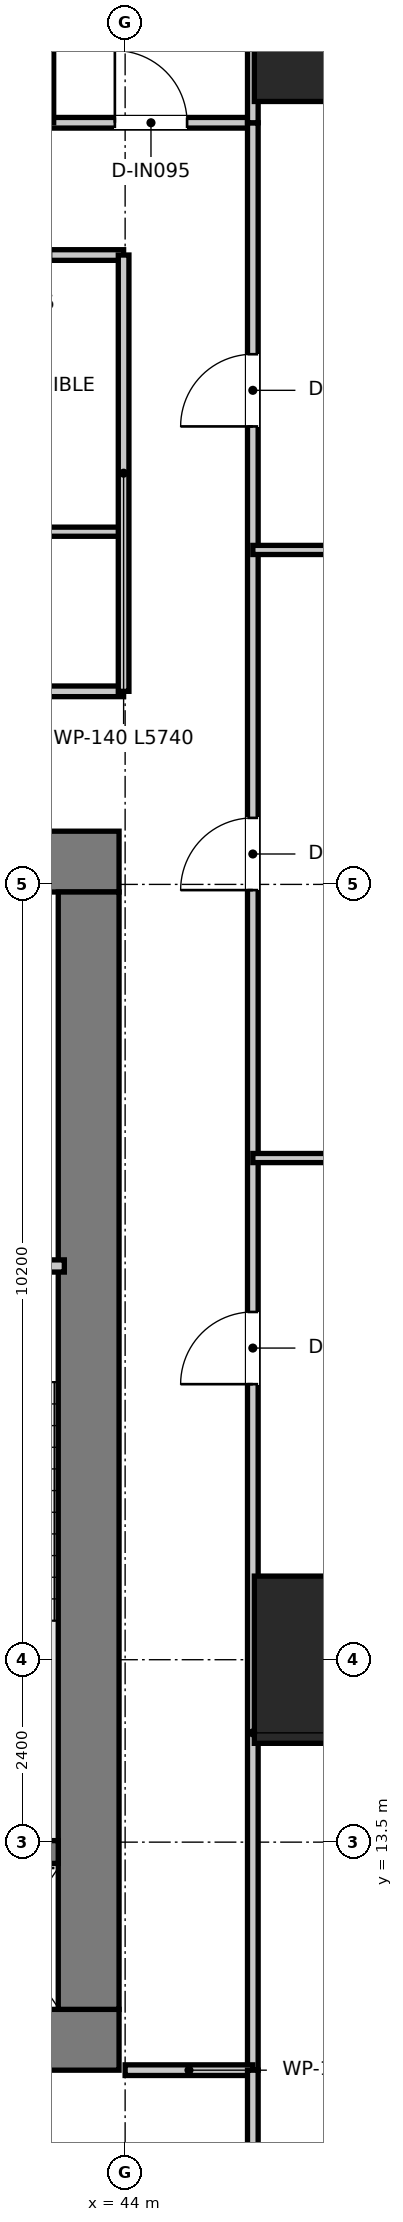
"""IFC4 building model, lengths in metres.
Left out: names, types, materials, properties, quantities, classifications, styles, units other than length and angle.
Written with IfcOpenShell. Run it as: python <this file> out.ifc"""

import sys

from ifc_helpers import new_model, si_unit, direction, frame, frame_2d, origin, origin_2d, place, context, subcontext, project, spatial, rectangle, extrude, source, transform, mapped, element, fill, save


model = new_model("IFC4")
c1 = context("Model", 3, precision=1e-05, world=origin(), true_north=direction((0.0, 1.0)))
c2 = subcontext(c1, "Body", "Model", "MODEL_VIEW")
j1 = project(units=[si_unit("LENGTHUNIT", "METRE"), si_unit("PLANEANGLEUNIT", "RADIAN")], contexts=[c1])
p1 = place(None, origin())
s1 = spatial("IfcSite", under=j1, at=p1, CompositionType="ELEMENT")
p2 = place(p1, origin())
s2 = spatial("IfcBuilding", under=s1, at=p2, CompositionType="ELEMENT")
p3 = place(p2, frame((0.0, 0.0, 56.6)))
s3 = spatial("IfcBuildingStorey", under=s2, at=p3, CompositionType="ELEMENT", Elevation=56.6)
p4 = place(p3, frame((28.08, 10.9, 0.0), z_axis=(0.0, 0.0, 1.0), x_axis=(1.0, 0.0, 0.0)))
e1 = element("IfcWall", 1, at=p4, inside=s3, PredefinedType="SHEAR", context=c2, shape_type="SweptSolid", body=[
    extrude(rectangle(XDim=15.84, YDim=0.8, at=frame_2d((7.92, 0.0))), origin(), (0.0, 0.0, 1.0), 3.95),
])
p5 = place(p3, frame((28.08, 26.4, 0.0), z_axis=(0.0, 0.0, 1.0), x_axis=(1.0, 0.0, 0.0)))
e2 = element("IfcWall", 2, at=p5, inside=s3, PredefinedType="SHEAR", context=c2, shape_type="SweptSolid", body=[
    extrude(rectangle(XDim=15.84, YDim=0.8, at=frame_2d((7.92, 0.0))), origin(), (0.0, 0.0, 1.0), 3.95),
])
p6 = place(p5, frame((7.22, 0.0, 0.0)))
e3 = element("IfcOpeningElement", 3, at=p6, cuts=e2, PredefinedType="OPENING", context=c2, shape_type="SweptSolid", body=[
    extrude(rectangle(XDim=1.4, YDim=2.2, at=frame_2d((0.7, 1.1))), frame((0.0, 0.41, 0.0), z_axis=(0.0, -1.0, 0.0), x_axis=(1.0, 0.0, 0.0)), (0.0, 0.0, 1.0), 0.82),
])
p7 = place(p5, frame((1.775, 0.0, 0.0)))
e4 = element("IfcOpeningElement", 4, at=p7, cuts=e2, PredefinedType="OPENING", context=c2, shape_type="SweptSolid", body=[
    extrude(rectangle(XDim=1.05, YDim=2.1, at=frame_2d((0.525, 1.05))), frame((0.0, 0.41, 0.0), z_axis=(0.0, -1.0, 0.0), x_axis=(1.0, 0.0, 0.0)), (0.0, 0.0, 1.0), 0.82),
])
p8 = place(p5, frame((13.015, 0.0, 0.0)))
e5 = element("IfcOpeningElement", 5, at=p8, cuts=e2, PredefinedType="OPENING", context=c2, shape_type="SweptSolid", body=[
    extrude(rectangle(XDim=1.05, YDim=2.1, at=frame_2d((0.525, 1.05))), frame((0.0, 0.41, 0.0), z_axis=(0.0, -1.0, 0.0), x_axis=(1.0, 0.0, 0.0)), (0.0, 0.0, 1.0), 0.82),
])
p9 = place(p3, frame((43.52, 11.3, 0.0), z_axis=(0.0, 0.0, 1.0), x_axis=(0.0, 1.0, 0.0)))
e6 = element("IfcWall", 6, at=p9, inside=s3, PredefinedType="SHEAR", context=c2, shape_type="SweptSolid", body=[
    extrude(rectangle(XDim=14.7, YDim=0.8, at=frame_2d((7.35, 0.0))), origin(), (0.0, 0.0, 1.0), 3.95),
])
p10 = place(p3, frame((40.02, 13.37, 0.0), z_axis=(0.0, 0.0, 1.0), x_axis=(1.0, 0.0, 0.0)))
e7 = element("IfcWall", 7, at=p10, inside=s3, PredefinedType="SHEAR", context=c2, shape_type="SweptSolid", body=[
    extrude(rectangle(XDim=3.1, YDim=0.3, at=frame_2d((1.55, 0.0))), origin(), (0.0, 0.0, 1.0), 3.95),
])
m1 = source(origin(), c2, "Body", "SweptSolid", [
    extrude(rectangle(XDim=2.2, YDim=2.2, at=origin_2d()), origin(), (0.0, 0.0, 1.0), 3.95),
])
for number, where, z_axis, x_axis in (
    (8, (46.8, 15.9, 0.0), (0.0, 0.0, 1.0), (1.0, 0.0, 0.0)),
    (9, (46.8, 37.5, 0.0), (0.0, 0.0, 1.0), (1.0, 0.0, 0.0)),
):
    element("IfcColumn", number, at=place(p3, frame(where, z_axis=z_axis, x_axis=x_axis)), inside=s3, PredefinedType="USERDEFINED", context=c2, shape_type="MappedRepresentation", body=[
        mapped(m1, transform((0.0, 0.0, 0.0), x_axis=(1.0, 0.0, 0.0), y_axis=(0.0, 1.0, 0.0), z_axis=(0.0, 0.0, 1.0), scale=1.0)),
    ])
p11 = place(p3, frame((40.04, 21.08, 0.0), z_axis=(0.0, 0.0, 1.0), x_axis=(1.0, 0.0, 0.0)))
e10 = element("IfcWall", 10, at=p11, inside=s3, PredefinedType="PARTITIONING", context=c2, shape_type="SweptSolid", body=[
    extrude(rectangle(XDim=3.16, YDim=0.16, at=frame_2d((1.58, 0.0))), origin(), (0.0, 0.0, 1.0), 3.67),
])
p12 = place(p11, frame((1.055, 0.0, 0.0)))
e11 = element("IfcOpeningElement", 11, at=p12, cuts=e10, PredefinedType="OPENING", context=c2, shape_type="SweptSolid", body=[
    extrude(rectangle(XDim=1.05, YDim=2.1, at=frame_2d((0.525, 1.05))), frame((0.0, 0.09, 0.0), z_axis=(0.0, -1.0, 0.0), x_axis=(1.0, 0.0, 0.0)), (0.0, 0.0, 1.0), 0.18),
])
p13 = place(p3, frame((28.02, 28.64, 0.0), z_axis=(0.0, 0.0, 1.0), x_axis=(1.0, 0.0, 0.0)))
e12 = element("IfcWall", 12, at=p13, inside=s3, PredefinedType="PARTITIONING", context=c2, shape_type="SweptSolid", body=[
    extrude(rectangle(XDim=15.96, YDim=0.14, at=frame_2d((7.98, 0.0))), origin(), (0.0, 0.0, 1.0), 3.08),
])
p14 = place(p13, frame((7.455, 0.0, 0.0)))
e13 = element("IfcOpeningElement", 13, at=p14, cuts=e12, PredefinedType="OPENING", context=c2, shape_type="SweptSolid", body=[
    extrude(rectangle(XDim=1.05, YDim=2.15, at=frame_2d((0.525, 1.075))), frame((0.0, 0.08, 0.0), z_axis=(0.0, -1.0, 0.0), x_axis=(1.0, 0.0, 0.0)), (0.0, 0.0, 1.0), 0.16),
])
p15 = place(p3, frame((28.02, 30.74, 0.0), z_axis=(0.0, 0.0, 1.0), x_axis=(1.0, 0.0, 0.0)))
e14 = element("IfcWall", 14, at=p15, inside=s3, PredefinedType="PARTITIONING", context=c2, shape_type="SweptSolid", body=[
    extrude(rectangle(XDim=15.96, YDim=0.12, at=frame_2d((7.98, 0.0))), origin(), (0.0, 0.0, 1.0), 3.08),
])
p16 = place(p3, frame((28.02, 34.38, 0.0), z_axis=(0.0, 0.0, 1.0), x_axis=(1.0, 0.0, 0.0)))
e15 = element("IfcWall", 15, at=p16, inside=s3, PredefinedType="PARTITIONING", context=c2, shape_type="SweptSolid", body=[
    extrude(rectangle(XDim=15.96, YDim=0.14, at=frame_2d((7.98, 0.0))), origin(), (0.0, 0.0, 1.0), 3.08),
])
p17 = place(p16, frame((7.83, 0.0, 0.0)))
e16 = element("IfcOpeningElement", 16, at=p17, cuts=e15, PredefinedType="OPENING", context=c2, shape_type="SweptSolid", body=[
    extrude(rectangle(XDim=0.9, YDim=2.1, at=frame_2d((0.45, 1.05))), frame((0.0, 0.08, 0.0), z_axis=(0.0, -1.0, 0.0), x_axis=(1.0, 0.0, 0.0)), (0.0, 0.0, 1.0), 0.16),
])
p18 = place(p16, frame((11.03, 0.0, 0.0)))
e17 = element("IfcOpeningElement", 17, at=p18, cuts=e15, PredefinedType="OPENING", context=c2, shape_type="SweptSolid", body=[
    extrude(rectangle(XDim=0.9, YDim=2.1, at=frame_2d((0.45, 1.05))), frame((0.0, 0.08, 0.0), z_axis=(0.0, -1.0, 0.0), x_axis=(1.0, 0.0, 0.0)), (0.0, 0.0, 1.0), 0.16),
])
p19 = place(p16, frame((14.055, 0.0, 0.0)))
e18 = element("IfcOpeningElement", 18, at=p19, cuts=e15, PredefinedType="OPENING", context=c2, shape_type="SweptSolid", body=[
    extrude(rectangle(XDim=0.95, YDim=2.1, at=frame_2d((0.475, 1.05))), frame((0.0, 0.08, 0.0), z_axis=(0.0, -1.0, 0.0), x_axis=(1.0, 0.0, 0.0)), (0.0, 0.0, 1.0), 0.16),
])
p20 = place(p16, frame((2.855, 0.0, 0.0)))
e19 = element("IfcOpeningElement", 19, at=p20, cuts=e15, PredefinedType="OPENING", context=c2, shape_type="SweptSolid", body=[
    extrude(rectangle(XDim=0.95, YDim=2.1, at=frame_2d((0.475, 1.05))), frame((0.0, 0.08, 0.0), z_axis=(0.0, -1.0, 0.0), x_axis=(1.0, 0.0, 0.0)), (0.0, 0.0, 1.0), 0.16),
])
p21 = place(p3, frame((43.98, 28.64, 0.0), z_axis=(0.0, 0.0, 1.0), x_axis=(0.0, 1.0, 0.0)))
e20 = element("IfcWall", 20, at=p21, inside=s3, PredefinedType="PARTITIONING", context=c2, shape_type="SweptSolid", body=[
    extrude(rectangle(XDim=5.74, YDim=0.14, at=frame_2d((2.87, 0.0))), origin(), (0.0, 0.0, 1.0), 3.22),
])
p22 = place(p3, frame((26.32, 36.12, 0.0), z_axis=(0.0, 0.0, 1.0), x_axis=(1.0, 0.0, 0.0)))
e21 = element("IfcWall", 21, at=p22, inside=s3, PredefinedType="PARTITIONING", context=c2, shape_type="SweptSolid", body=[
    extrude(rectangle(XDim=19.36, YDim=0.14, at=frame_2d((9.68, 0.0))), origin(), (0.0, 0.0, 1.0), 3.08),
])
p23 = place(p22, frame((1.115, 0.0, 0.0)))
e22 = element("IfcOpeningElement", 22, at=p23, cuts=e21, PredefinedType="OPENING", context=c2, shape_type="SweptSolid", body=[
    extrude(rectangle(XDim=0.95, YDim=2.1, at=frame_2d((0.475, 1.05))), frame((0.0, 0.08, 0.0), z_axis=(0.0, -1.0, 0.0), x_axis=(1.0, 0.0, 0.0)), (0.0, 0.0, 1.0), 0.16),
])
p24 = place(p22, frame((4.955, 0.0, 0.0)))
e23 = element("IfcOpeningElement", 23, at=p24, cuts=e21, PredefinedType="OPENING", context=c2, shape_type="SweptSolid", body=[
    extrude(rectangle(XDim=0.95, YDim=2.1, at=frame_2d((0.475, 1.05))), frame((0.0, 0.08, 0.0), z_axis=(0.0, -1.0, 0.0), x_axis=(1.0, 0.0, 0.0)), (0.0, 0.0, 1.0), 0.16),
])
p25 = place(p22, frame((9.455, 0.0, 0.0)))
e24 = element("IfcOpeningElement", 24, at=p25, cuts=e21, PredefinedType="OPENING", context=c2, shape_type="SweptSolid", body=[
    extrude(rectangle(XDim=0.95, YDim=2.1, at=frame_2d((0.475, 1.05))), frame((0.0, 0.08, 0.0), z_axis=(0.0, -1.0, 0.0), x_axis=(1.0, 0.0, 0.0)), (0.0, 0.0, 1.0), 0.16),
])
p26 = place(p22, frame((13.955, 0.0, 0.0)))
e25 = element("IfcOpeningElement", 25, at=p26, cuts=e21, PredefinedType="OPENING", context=c2, shape_type="SweptSolid", body=[
    extrude(rectangle(XDim=0.95, YDim=2.1, at=frame_2d((0.475, 1.05))), frame((0.0, 0.08, 0.0), z_axis=(0.0, -1.0, 0.0), x_axis=(1.0, 0.0, 0.0)), (0.0, 0.0, 1.0), 0.16),
])
p27 = place(p22, frame((17.545, 0.0, 0.0)))
e26 = element("IfcOpeningElement", 26, at=p27, cuts=e21, PredefinedType="OPENING", context=c2, shape_type="SweptSolid", body=[
    extrude(rectangle(XDim=0.95, YDim=2.1, at=frame_2d((0.475, 1.05))), frame((0.0, 0.08, 0.0), z_axis=(0.0, -1.0, 0.0), x_axis=(1.0, 0.0, 0.0)), (0.0, 0.0, 1.0), 0.16),
])
p28 = place(p3, frame((45.68, 10.5, 0.0), z_axis=(0.0, 0.0, 1.0), x_axis=(0.0, 1.0, 0.0)))
e27 = element("IfcWall", 27, at=p28, inside=s3, PredefinedType="PARTITIONING", context=c2, shape_type="SweptSolid", body=[
    extrude(rectangle(XDim=25.62, YDim=0.14, at=frame_2d((12.81, 0.0))), origin(), (0.0, 0.0, 1.0), 2.97),
])
p29 = place(p28, frame((9.025, 0.0, 0.0)))
e28 = element("IfcOpeningElement", 28, at=p29, cuts=e27, PredefinedType="OPENING", context=c2, shape_type="SweptSolid", body=[
    extrude(rectangle(XDim=0.95, YDim=2.1, at=frame_2d((0.475, 1.05))), frame((0.0, 0.08, 0.0), z_axis=(0.0, -1.0, 0.0), x_axis=(1.0, 0.0, 0.0)), (0.0, 0.0, 1.0), 0.16),
])
p30 = place(p28, frame((15.525, 0.0, 0.0)))
e29 = element("IfcOpeningElement", 29, at=p30, cuts=e27, PredefinedType="OPENING", context=c2, shape_type="SweptSolid", body=[
    extrude(rectangle(XDim=0.95, YDim=2.1, at=frame_2d((0.475, 1.05))), frame((0.0, 0.08, 0.0), z_axis=(0.0, -1.0, 0.0), x_axis=(1.0, 0.0, 0.0)), (0.0, 0.0, 1.0), 0.16),
])
p31 = place(p28, frame((21.625, 0.0, 0.0)))
e30 = element("IfcOpeningElement", 30, at=p31, cuts=e27, PredefinedType="OPENING", context=c2, shape_type="SweptSolid", body=[
    extrude(rectangle(XDim=0.95, YDim=2.1, at=frame_2d((0.475, 1.05))), frame((0.0, 0.08, 0.0), z_axis=(0.0, -1.0, 0.0), x_axis=(1.0, 0.0, 0.0)), (0.0, 0.0, 1.0), 0.16),
])
p32 = place(p3, frame((44.0, 10.5, 0.0), z_axis=(0.0, 0.0, 1.0), x_axis=(1.0, 0.0, 0.0)))
e31 = element("IfcWall", 31, at=p32, inside=s3, PredefinedType="PARTITIONING", context=c2, shape_type="SweptSolid", body=[
    extrude(rectangle(XDim=1.68, YDim=0.14, at=frame_2d((0.84, 0.0))), origin(), (0.0, 0.0, 1.0), 3.67),
])
p33 = place(p3, frame((45.68, 36.12, 0.0), z_axis=(0.0, 0.0, 1.0), x_axis=(0.0, 1.0, 0.0)))
e32 = element("IfcWall", 32, at=p33, inside=s3, PredefinedType="PARTITIONING", context=c2, shape_type="SweptSolid", body=[
    extrude(rectangle(XDim=14.563, YDim=0.14, at=frame_2d((7.282, 0.0))), origin(), (0.0, 0.0, 1.0), 2.97),
])
p34 = place(p3, frame((45.68, 0.553, 0.0), z_axis=(0.0, 0.0, 1.0), x_axis=(0.0, 1.0, 0.0)))
e33 = element("IfcWall", 33, at=p34, inside=s3, PredefinedType="PARTITIONING", context=c2, shape_type="SweptSolid", body=[
    extrude(rectangle(XDim=9.947, YDim=0.14, at=frame_2d((4.973, 0.0))), origin(), (0.0, 0.0, 1.0), 3.67),
])
p35 = place(p3, frame((43.0, 36.12, 0.0), z_axis=(0.0, 0.0, 1.0), x_axis=(0.0, 1.0, 0.0)))
e34 = element("IfcWall", 34, at=p35, inside=s3, PredefinedType="PARTITIONING", context=c2, shape_type="SweptSolid", body=[
    extrude(rectangle(XDim=14.863, YDim=0.12, at=frame_2d((7.431, 0.0))), origin(), (0.0, 0.0, 1.0), 2.97),
])
p36 = place(p3, frame((45.68, 22.5, 0.0), z_axis=(0.0, 0.0, 1.0), x_axis=(1.0, 0.0, 0.0)))
e35 = element("IfcWall", 35, at=p36, inside=s3, PredefinedType="PARTITIONING", context=c2, shape_type="SweptSolid", body=[
    extrude(rectangle(XDim=14.916, YDim=0.12, at=frame_2d((7.458, 0.0))), origin(), (0.0, 0.0, 1.0), 2.97),
])
p37 = place(p3, frame((45.68, 30.5, 0.0), z_axis=(0.0, 0.0, 1.0), x_axis=(1.0, 0.0, 0.0)))
e36 = element("IfcWall", 36, at=p37, inside=s3, PredefinedType="PARTITIONING", context=c2, shape_type="SweptSolid", body=[
    extrude(rectangle(XDim=15.81, YDim=0.12, at=frame_2d((7.905, 0.0))), origin(), (0.0, 0.0, 1.0), 2.97),
])
p38 = place(p27, origin())
e37 = element("IfcDoor", 37, at=p38, inside=s3, OperationType="SINGLE_SWING_LEFT", PredefinedType="DOOR", context=c2, shape_type="SweptSolid", body=[
    extrude(rectangle(XDim=0.95, YDim=2.1, at=frame_2d((0.475, 1.05))), frame((0.0, 0.025, 0.0), z_axis=(0.0, -1.0, 0.0), x_axis=(1.0, 0.0, 0.0)), (0.0, 0.0, 1.0), 0.05),
])
fill(e26, e37)
p39 = place(p29, origin())
e38 = element("IfcDoor", 38, at=p39, inside=s3, OperationType="SINGLE_SWING_LEFT", PredefinedType="DOOR", context=c2, shape_type="SweptSolid", body=[
    extrude(rectangle(XDim=0.95, YDim=2.1, at=frame_2d((0.475, 1.05))), frame((0.0, 0.025, 0.0), z_axis=(0.0, -1.0, 0.0), x_axis=(1.0, 0.0, 0.0)), (0.0, 0.0, 1.0), 0.05),
])
fill(e28, e38)
p40 = place(p30, origin())
e39 = element("IfcDoor", 39, at=p40, inside=s3, OperationType="SINGLE_SWING_LEFT", PredefinedType="DOOR", context=c2, shape_type="SweptSolid", body=[
    extrude(rectangle(XDim=0.95, YDim=2.1, at=frame_2d((0.475, 1.05))), frame((0.0, 0.025, 0.0), z_axis=(0.0, -1.0, 0.0), x_axis=(1.0, 0.0, 0.0)), (0.0, 0.0, 1.0), 0.05),
])
fill(e29, e39)
p41 = place(p31, origin())
e40 = element("IfcDoor", 40, at=p41, inside=s3, OperationType="SINGLE_SWING_LEFT", PredefinedType="DOOR", context=c2, shape_type="SweptSolid", body=[
    extrude(rectangle(XDim=0.95, YDim=2.1, at=frame_2d((0.475, 1.05))), frame((0.0, 0.025, 0.0), z_axis=(0.0, -1.0, 0.0), x_axis=(1.0, 0.0, 0.0)), (0.0, 0.0, 1.0), 0.05),
])
fill(e30, e40)
save(model, sys.argv[1])
